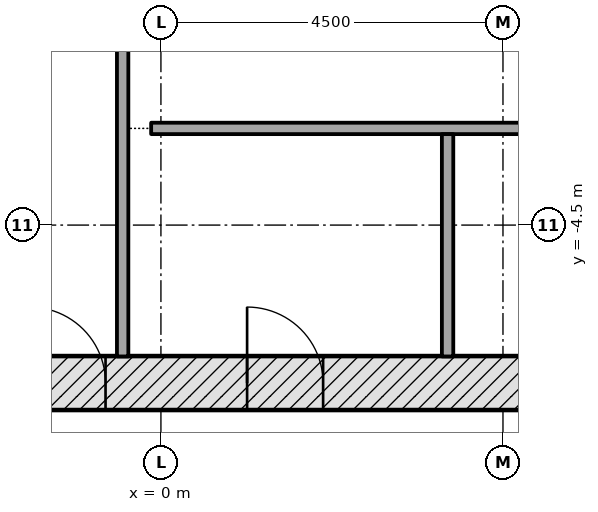
"""IFC4 building model, lengths in metres.
Left out: names, types, materials, properties, quantities, classifications, styles, units other than length and angle.
Written with IfcOpenShell. Run it as: python <this file> out.ifc"""

import sys

from ifc_helpers import new_model, si_unit, direction, frame, frame_2d, origin, place, context, subcontext, project, spatial, rectangle, extrude, element, fill, save


model = new_model("IFC4")
c1 = context("Model", 3, precision=1e-05, world=origin(), true_north=direction((0.0, 1.0)))
c2 = subcontext(c1, "Body", "Model", "MODEL_VIEW")
j1 = project(units=[si_unit("LENGTHUNIT", "METRE"), si_unit("PLANEANGLEUNIT", "RADIAN")], contexts=[c1])
p1 = place(None, origin())
s1 = spatial("IfcSite", under=j1, at=p1, CompositionType="ELEMENT")
p2 = place(p1, origin())
s2 = spatial("IfcBuilding", under=s1, at=p2, CompositionType="ELEMENT")
p3 = place(p2, frame((0.0, 0.0, 229.2)))
s3 = spatial("IfcBuildingStorey", under=s2, at=p3, CompositionType="ELEMENT", Elevation=229.2)
p4 = place(p3, frame((-9.229, -6.578, -0.2), z_axis=(0.0, 0.0, 1.0), x_axis=(1.0, 0.0, 0.0)))
e1 = element("IfcWall", 1, at=p4, inside=s3, PredefinedType="SHEAR", context=c2, shape_type="SweptSolid", body=[
    extrude(rectangle(XDim=18.458, YDim=0.7, at=frame_2d((9.229, 0.0))), origin(), (0.0, 0.0, 1.0), 3.6),
])
p5 = place(p4, frame((7.5, 0.0, 0.2)))
e2 = element("IfcOpeningElement", 2, at=p5, cuts=e1, PredefinedType="OPENING", context=c2, shape_type="SweptSolid", body=[
    extrude(rectangle(XDim=1.0, YDim=2.1, at=frame_2d((0.5, 1.05))), frame((0.0, 0.36, 0.0), z_axis=(0.0, -1.0, 0.0), x_axis=(1.0, 0.0, 0.0)), (0.0, 0.0, 1.0), 0.72),
])
p6 = place(p4, frame((3.389, 0.0, 0.2)))
e3 = element("IfcOpeningElement", 3, at=p6, cuts=e1, PredefinedType="OPENING", context=c2, shape_type="SweptSolid", body=[
    extrude(rectangle(XDim=0.9, YDim=2.1, at=frame_2d((0.45, 1.05))), frame((0.0, 0.36, 0.0), z_axis=(0.0, -1.0, 0.0), x_axis=(1.0, 0.0, 0.0)), (0.0, 0.0, 1.0), 0.72),
])
p7 = place(p4, frame((10.363, 0.0, 0.2)))
e4 = element("IfcOpeningElement", 4, at=p7, cuts=e1, PredefinedType="OPENING", context=c2, shape_type="SweptSolid", body=[
    extrude(rectangle(XDim=1.0, YDim=2.1, at=frame_2d((0.5, 1.05))), frame((0.0, 0.36, 0.0), z_axis=(0.0, -1.0, 0.0), x_axis=(1.0, 0.0, 0.0)), (0.0, 0.0, 1.0), 0.72),
])
p8 = place(p4, frame((15.077, 0.0, 0.2)))
e5 = element("IfcOpeningElement", 5, at=p8, cuts=e1, PredefinedType="OPENING", context=c2, shape_type="SweptSolid", body=[
    extrude(rectangle(XDim=0.9, YDim=2.1, at=frame_2d((0.45, 1.05))), frame((0.0, 0.36, 0.0), z_axis=(0.0, -1.0, 0.0), x_axis=(1.0, 0.0, 0.0)), (0.0, 0.0, 1.0), 0.72),
])
p9 = place(p3, frame((10.311, -4.703, -0.2), z_axis=(0.0, 0.0, 1.0), x_axis=(-0.500001446645, 0.866024568562, 0.0)))
e6 = element("IfcWall", 6, at=p9, inside=s3, PredefinedType="SHEAR", context=c2, shape_type="SweptSolid", body=[
    extrude(rectangle(XDim=18.458, YDim=0.7, at=frame_2d((9.229, 0.0))), origin(), (0.0, 0.0, 1.0), 3.6),
])
p10 = place(p9, frame((4.379, 0.0, 0.2)))
e7 = element("IfcOpeningElement", 7, at=p10, cuts=e6, PredefinedType="OPENING", context=c2, shape_type="SweptSolid", body=[
    extrude(rectangle(XDim=1.1, YDim=2.1, at=frame_2d((0.55, 1.05))), frame((0.0, 0.36, 0.0), z_axis=(0.0, -1.0, 0.0), x_axis=(1.0, 0.0, 0.0)), (0.0, 0.0, 1.0), 0.72),
])
p11 = place(p9, frame((6.529, 0.0, 0.2)))
e8 = element("IfcOpeningElement", 8, at=p11, cuts=e6, PredefinedType="OPENING", context=c2, shape_type="SweptSolid", body=[
    extrude(rectangle(XDim=1.1, YDim=2.1, at=frame_2d((0.55, 1.05))), frame((0.0, 0.36, 0.0), z_axis=(0.0, -1.0, 0.0), x_axis=(1.0, 0.0, 0.0)), (0.0, 0.0, 1.0), 0.72),
])
p12 = place(p9, frame((8.679, 0.0, 0.2)))
e9 = element("IfcOpeningElement", 9, at=p12, cuts=e6, PredefinedType="OPENING", context=c2, shape_type="SweptSolid", body=[
    extrude(rectangle(XDim=1.1, YDim=2.1, at=frame_2d((0.55, 1.05))), frame((0.0, 0.36, 0.0), z_axis=(0.0, -1.0, 0.0), x_axis=(1.0, 0.0, 0.0)), (0.0, 0.0, 1.0), 0.72),
])
p13 = place(p9, frame((10.829, 0.0, 0.2)))
e10 = element("IfcOpeningElement", 10, at=p13, cuts=e6, PredefinedType="OPENING", context=c2, shape_type="SweptSolid", body=[
    extrude(rectangle(XDim=1.1, YDim=2.1, at=frame_2d((0.55, 1.05))), frame((0.0, 0.36, 0.0), z_axis=(0.0, -1.0, 0.0), x_axis=(1.0, 0.0, 0.0)), (0.0, 0.0, 1.0), 0.72),
])
p14 = place(p9, frame((12.979, 0.0, 0.2)))
e11 = element("IfcOpeningElement", 11, at=p14, cuts=e6, PredefinedType="OPENING", context=c2, shape_type="SweptSolid", body=[
    extrude(rectangle(XDim=1.1, YDim=2.1, at=frame_2d((0.55, 1.05))), frame((0.0, 0.36, 0.0), z_axis=(0.0, -1.0, 0.0), x_axis=(1.0, 0.0, 0.0)), (0.0, 0.0, 1.0), 0.72),
])
p15 = place(p3, frame((-1.083, 11.281, -0.2), z_axis=(0.0, 0.0, 1.0), x_axis=(-0.500001446645, -0.866024568562, 0.0)))
e12 = element("IfcWall", 12, at=p15, inside=s3, PredefinedType="SHEAR", context=c2, shape_type="SweptSolid", body=[
    extrude(rectangle(XDim=18.458, YDim=0.7, at=frame_2d((9.229, 0.0))), origin(), (0.0, 0.0, 1.0), 3.6),
])
p16 = place(p15, frame((8.979, 0.0, 0.2)))
e13 = element("IfcOpeningElement", 13, at=p16, cuts=e12, PredefinedType="OPENING", context=c2, shape_type="SweptSolid", body=[
    extrude(rectangle(XDim=1.2, YDim=2.1, at=frame_2d((0.6, 1.05))), frame((0.0, 0.36, 0.0), z_axis=(0.0, -1.0, 0.0), x_axis=(1.0, 0.0, 0.0)), (0.0, 0.0, 1.0), 0.72),
])
p17 = place(p15, frame((11.029, 0.0, 0.2)))
e14 = element("IfcOpeningElement", 14, at=p17, cuts=e12, PredefinedType="OPENING", context=c2, shape_type="SweptSolid", body=[
    extrude(rectangle(XDim=1.2, YDim=2.1, at=frame_2d((0.6, 1.05))), frame((0.0, 0.36, 0.0), z_axis=(0.0, -1.0, 0.0), x_axis=(1.0, 0.0, 0.0)), (0.0, 0.0, 1.0), 0.72),
])
p18 = place(p3, frame((5.87, -2.961, 0.0), z_axis=(0.0, 0.0, 1.0), x_axis=(-0.50000615651, 0.866021849293, 0.0)))
e15 = element("IfcWall", 15, at=p18, inside=s3, PredefinedType="PARTITIONING", context=c2, shape_type="SweptSolid", body=[
    extrude(rectangle(XDim=11.0, YDim=0.25, at=frame_2d((5.5, 0.0))), origin(), (0.0, 0.0, 1.0), 3.4),
])
p19 = place(p3, frame((-0.504, 5.897, 0.0), z_axis=(0.0, 0.0, 1.0), x_axis=(0.0, -1.0, 0.0)))
e16 = element("IfcWall", 16, at=p19, inside=s3, PredefinedType="PARTITIONING", context=c2, shape_type="SweptSolid", body=[
    extrude(rectangle(XDim=12.125, YDim=0.15, at=frame_2d((6.062, 0.0))), origin(), (0.0, 0.0, 1.0), 3.4),
])
p20 = place(p19, frame((4.114, 0.0, 0.0)))
e17 = element("IfcOpeningElement", 17, at=p20, cuts=e16, PredefinedType="OPENING", context=c2, shape_type="SweptSolid", body=[
    extrude(rectangle(XDim=0.9, YDim=2.1, at=frame_2d((0.45, 1.05))), frame((0.0, 0.085, 0.0), z_axis=(0.0, -1.0, 0.0), x_axis=(1.0, 0.0, 0.0)), (0.0, 0.0, 1.0), 0.17),
])
p21 = place(p3, frame((-0.129, -3.228, 0.0), z_axis=(0.0, 0.0, 1.0), x_axis=(1.0, 0.0, 0.0)))
e18 = element("IfcWall", 18, at=p21, inside=s3, PredefinedType="PARTITIONING", context=c2, shape_type="SweptSolid", body=[
    extrude(rectangle(XDim=9.139, YDim=0.15, at=frame_2d((4.57, 0.0))), origin(), (0.0, 0.0, 1.0), 3.4),
])
p22 = place(p3, frame((3.771, -3.303, 0.0), z_axis=(0.0, 0.0, 1.0), x_axis=(0.0, -1.0, 0.0)))
e19 = element("IfcWall", 19, at=p22, inside=s3, PredefinedType="PARTITIONING", context=c2, shape_type="SweptSolid", body=[
    extrude(rectangle(XDim=2.925, YDim=0.15, at=frame_2d((1.462, 0.0))), origin(), (0.0, 0.0, 1.0), 3.4),
])
p23 = place(p5, origin())
e20 = element("IfcDoor", 20, at=p23, inside=s3, OperationType="SINGLE_SWING_LEFT", PredefinedType="DOOR", context=c2, shape_type="SweptSolid", body=[
    extrude(rectangle(XDim=1.0, YDim=2.1, at=frame_2d((0.5, 1.05))), frame((0.0, 0.075, 0.0), z_axis=(0.0, -1.0, 0.0), x_axis=(1.0, 0.0, 0.0)), (0.0, 0.0, 1.0), 0.15),
])
fill(e2, e20)
p24 = place(p7, origin())
e21 = element("IfcDoor", 21, at=p24, inside=s3, OperationType="SINGLE_SWING_LEFT", PredefinedType="DOOR", context=c2, shape_type="SweptSolid", body=[
    extrude(rectangle(XDim=1.0, YDim=2.1, at=frame_2d((0.5, 1.05))), frame((0.0, 0.075, 0.0), z_axis=(0.0, -1.0, 0.0), x_axis=(1.0, 0.0, 0.0)), (0.0, 0.0, 1.0), 0.15),
])
fill(e4, e21)
save(model, sys.argv[1])
